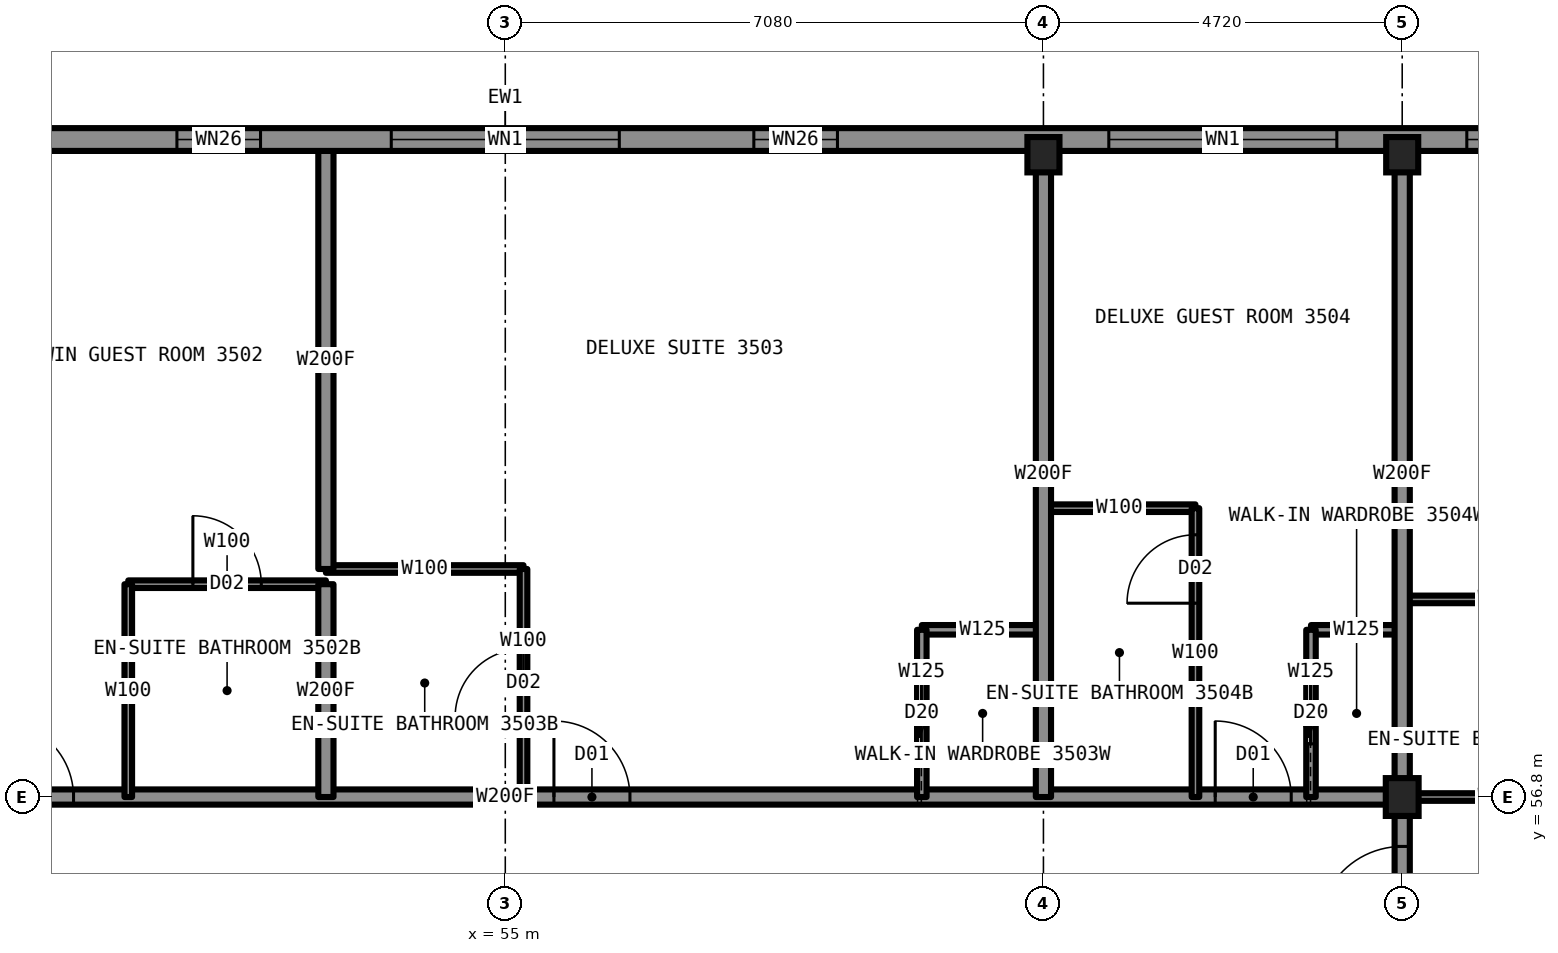
"""IFC4 building model, lengths in metres.
Left out: names, types, materials, properties, quantities, classifications, styles, units other than length and angle.
Written with IfcOpenShell. Run it as: python <this file> out.ifc"""

import sys

from ifc_helpers import new_model, si_unit, direction, frame, frame_2d, origin, origin_2d, place, context, subcontext, project, spatial, rectangle, i_section, extrude, element, fill, save


model = new_model("IFC4")
c1 = context("Model", 3, precision=1e-05, world=origin(), true_north=direction((0.0, 1.0)))
c2 = subcontext(c1, "Body", "Model", "MODEL_VIEW")
j1 = project(units=[si_unit("LENGTHUNIT", "METRE"), si_unit("PLANEANGLEUNIT", "RADIAN")], contexts=[c1])
p1 = place(None, origin())
s1 = spatial("IfcSite", under=j1, at=p1, CompositionType="ELEMENT")
p2 = place(p1, origin())
s2 = spatial("IfcBuilding", under=s1, at=p2, CompositionType="ELEMENT")
p3 = place(p2, frame((0.0, 0.0, 124.9)))
s3 = spatial("IfcBuildingStorey", under=s2, at=p3, CompositionType="ELEMENT", Elevation=124.9)
for number, where, z_axis, x_axis in (
    (1, (62.08, 65.25, 0.0), (0.0, 0.0, 1.0), (1.0, 0.0, 0.0)),
    (2, (66.8, 65.25, 0.0), (0.0, 0.0, 1.0), (1.0, 0.0, 0.0)),
):
    element("IfcColumn", number, at=place(p3, frame(where, z_axis=z_axis, x_axis=x_axis)), inside=s3, PredefinedType="COLUMN", context=c2, shape_type="SweptSolid", body=[
        extrude(i_section(OverallWidth=0.422, OverallDepth=0.465, WebThickness=0.045, FlangeThickness=0.073, at=origin_2d()), origin(), (0.0, 0.0, 1.0), 3.5),
    ])
p4 = place(p3, frame((66.8, 56.8, 0.0), z_axis=(0.0, 0.0, 1.0), x_axis=(1.0, 0.0, 0.0)))
e3 = element("IfcColumn", 3, at=p4, inside=s3, PredefinedType="COLUMN", context=c2, shape_type="SweptSolid", body=[
    extrude(i_section(OverallWidth=0.432, OverallDepth=0.498, WebThickness=0.056, FlangeThickness=0.089, at=origin_2d()), origin(), (0.0, 0.0, 1.0), 3.5),
])
p5 = place(p3, frame((66.8, 56.8, 0.0), z_axis=(0.0, 0.0, 1.0), x_axis=(1.0, 0.0, 0.0)))
e4 = element("IfcWall", 4, at=p5, inside=s3, PredefinedType="PARTITIONING", context=c2, shape_type="SweptSolid", body=[
    extrude(rectangle(XDim=2.6, YDim=0.1, at=frame_2d((1.3, 0.0))), origin(), (0.0, 0.0, 1.0), 2.573),
])
p6 = place(p3, frame((43.2, 56.8, 0.0), z_axis=(0.0, 0.0, 1.0), x_axis=(1.0, 0.0, 0.0)))
e5 = element("IfcWall", 5, at=p6, inside=s3, PredefinedType="PARTITIONING", context=c2, shape_type="SweptSolid", body=[
    extrude(rectangle(XDim=23.6, YDim=0.2, at=frame_2d((11.8, 0.0))), origin(), (0.0, 0.0, 1.0), 3.33),
])
p7 = place(p6, frame((0.7, 0.0, 0.0)))
e6 = element("IfcOpeningElement", 6, at=p7, cuts=e5, PredefinedType="OPENING", context=c2, shape_type="SweptSolid", body=[
    extrude(rectangle(XDim=1.0, YDim=2.2, at=frame_2d((0.5, 1.1))), frame((0.0, 0.11, 0.0), z_axis=(0.0, -1.0, 0.0), x_axis=(1.0, 0.0, 0.0)), (0.0, 0.0, 1.0), 0.22),
])
p8 = place(p6, frame((5.12, 0.0, 0.0)))
e7 = element("IfcOpeningElement", 7, at=p8, cuts=e5, PredefinedType="OPENING", context=c2, shape_type="SweptSolid", body=[
    extrude(rectangle(XDim=1.0, YDim=2.2, at=frame_2d((0.5, 1.1))), frame((0.0, 0.11, 0.0), z_axis=(0.0, -1.0, 0.0), x_axis=(1.0, 0.0, 0.0)), (0.0, 0.0, 1.0), 0.22),
])
p9 = place(p6, frame((12.44, 0.0, 0.0)))
e8 = element("IfcOpeningElement", 8, at=p9, cuts=e5, PredefinedType="OPENING", context=c2, shape_type="SweptSolid", body=[
    extrude(rectangle(XDim=1.0, YDim=2.2, at=frame_2d((0.5, 1.1))), frame((0.0, 0.11, 0.0), z_axis=(0.0, -1.0, 0.0), x_axis=(1.0, 0.0, 0.0)), (0.0, 0.0, 1.0), 0.22),
])
p10 = place(p6, frame((21.14, 0.0, 0.0)))
e9 = element("IfcOpeningElement", 9, at=p10, cuts=e5, PredefinedType="OPENING", context=c2, shape_type="SweptSolid", body=[
    extrude(rectangle(XDim=1.0, YDim=2.2, at=frame_2d((0.5, 1.1))), frame((0.0, 0.11, 0.0), z_axis=(0.0, -1.0, 0.0), x_axis=(1.0, 0.0, 0.0)), (0.0, 0.0, 1.0), 0.22),
])
p11 = place(p3, frame((60.48, 59.0, 0.0), z_axis=(0.0, 0.0, 1.0), x_axis=(1.0, 0.0, 0.0)))
e10 = element("IfcWall", 10, at=p11, inside=s3, PredefinedType="PARTITIONING", context=c2, shape_type="SweptSolid", body=[
    extrude(rectangle(XDim=1.6, YDim=0.125, at=frame_2d((0.8, 0.0))), origin(), (0.0, 0.0, 1.0), 3.33),
])
p12 = place(p3, frame((65.6, 59.0, 0.0), z_axis=(0.0, 0.0, 1.0), x_axis=(1.0, 0.0, 0.0)))
e11 = element("IfcWall", 11, at=p12, inside=s3, PredefinedType="PARTITIONING", context=c2, shape_type="SweptSolid", body=[
    extrude(rectangle(XDim=1.2, YDim=0.125, at=frame_2d((0.6, 0.0))), origin(), (0.0, 0.0, 1.0), 3.33),
])
p13 = place(p3, frame((66.8, 59.4, 0.0), z_axis=(0.0, 0.0, 1.0), x_axis=(1.0, 0.0, 0.0)))
e12 = element("IfcWall", 12, at=p13, inside=s3, PredefinedType="PARTITIONING", context=c2, shape_type="SweptSolid", body=[
    extrude(rectangle(XDim=2.6, YDim=0.1, at=frame_2d((1.3, 0.0))), origin(), (0.0, 0.0, 1.0), 3.33),
])
p14 = place(p3, frame((50.04, 59.6, 0.0), z_axis=(0.0, 0.0, 1.0), x_axis=(1.0, 0.0, 0.0)))
e13 = element("IfcWall", 13, at=p14, inside=s3, PredefinedType="PARTITIONING", context=c2, shape_type="SweptSolid", body=[
    extrude(rectangle(XDim=2.6, YDim=0.1, at=frame_2d((1.3, 0.0))), origin(), (0.0, 0.0, 1.0), 3.33),
])
p15 = place(p14, frame((0.85, 0.0, 0.0)))
e14 = element("IfcOpeningElement", 14, at=p15, cuts=e13, PredefinedType="OPENING", context=c2, shape_type="SweptSolid", body=[
    extrude(rectangle(XDim=0.9, YDim=2.1, at=frame_2d((0.45, 1.05))), frame((0.0, 0.06, 0.0), z_axis=(0.0, -1.0, 0.0), x_axis=(1.0, 0.0, 0.0)), (0.0, 0.0, 1.0), 0.12),
])
p16 = place(p3, frame((52.64, 59.8, 0.0), z_axis=(0.0, 0.0, 1.0), x_axis=(1.0, 0.0, 0.0)))
e15 = element("IfcWall", 15, at=p16, inside=s3, PredefinedType="PARTITIONING", context=c2, shape_type="SweptSolid", body=[
    extrude(rectangle(XDim=2.6, YDim=0.1, at=frame_2d((1.3, 0.0))), origin(), (0.0, 0.0, 1.0), 3.33),
])
p17 = place(p3, frame((62.08, 60.6, 0.0), z_axis=(0.0, 0.0, 1.0), x_axis=(1.0, 0.0, 0.0)))
e16 = element("IfcWall", 16, at=p17, inside=s3, PredefinedType="PARTITIONING", context=c2, shape_type="SweptSolid", body=[
    extrude(rectangle(XDim=2.0, YDim=0.1, at=frame_2d((1.0, 0.0))), origin(), (0.0, 0.0, 1.0), 3.33),
])
p18 = place(p3, frame((52.64, 56.8, 0.0), z_axis=(0.0, 0.0, 1.0), x_axis=(0.0, 1.0, 0.0)))
e17 = element("IfcWall", 17, at=p18, inside=s3, PredefinedType="PARTITIONING", context=c2, shape_type="SweptSolid", body=[
    extrude(rectangle(XDim=2.8, YDim=0.2, at=frame_2d((1.4, 0.0))), origin(), (0.0, 0.0, 1.0), 3.33),
])
p19 = place(p3, frame((52.64, 59.8, 0.0), z_axis=(0.0, 0.0, 1.0), x_axis=(0.0, 1.0, 0.0)))
e18 = element("IfcWall", 18, at=p19, inside=s3, PredefinedType="PARTITIONING", context=c2, shape_type="SweptSolid", body=[
    extrude(rectangle(XDim=5.5, YDim=0.2, at=frame_2d((2.75, 0.0))), origin(), (0.0, 0.0, 1.0), 3.33),
])
p20 = place(p3, frame((50.04, 56.8, 0.0), z_axis=(0.0, 0.0, 1.0), x_axis=(0.0, 1.0, 0.0)))
e19 = element("IfcWall", 19, at=p20, inside=s3, PredefinedType="PARTITIONING", context=c2, shape_type="SweptSolid", body=[
    extrude(rectangle(XDim=2.8, YDim=0.1, at=frame_2d((1.4, 0.0))), origin(), (0.0, 0.0, 1.0), 3.33),
])
p21 = place(p3, frame((55.24, 56.8, 0.0), z_axis=(0.0, 0.0, 1.0), x_axis=(0.0, 1.0, 0.0)))
e20 = element("IfcWall", 20, at=p21, inside=s3, PredefinedType="PARTITIONING", context=c2, shape_type="SweptSolid", body=[
    extrude(rectangle(XDim=3.0, YDim=0.1, at=frame_2d((1.5, 0.0))), origin(), (0.0, 0.0, 1.0), 3.33),
])
p22 = place(p21, frame((1.05, 0.0, 0.0)))
e21 = element("IfcOpeningElement", 21, at=p22, cuts=e20, PredefinedType="OPENING", context=c2, shape_type="SweptSolid", body=[
    extrude(rectangle(XDim=0.9, YDim=2.1, at=frame_2d((0.45, 1.05))), frame((0.0, 0.06, 0.0), z_axis=(0.0, -1.0, 0.0), x_axis=(1.0, 0.0, 0.0)), (0.0, 0.0, 1.0), 0.12),
])
p23 = place(p3, frame((65.6, 56.8, 0.0), z_axis=(0.0, 0.0, 1.0), x_axis=(0.0, 1.0, 0.0)))
e22 = element("IfcWall", 22, at=p23, inside=s3, PredefinedType="PARTITIONING", context=c2, shape_type="SweptSolid", body=[
    extrude(rectangle(XDim=2.2, YDim=0.125, at=frame_2d((1.1, 0.0))), origin(), (0.0, 0.0, 1.0), 3.33),
])
p24 = place(p23, frame((0.7, 0.0, 0.0)))
e23 = element("IfcOpeningElement", 23, at=p24, cuts=e22, PredefinedType="OPENING", context=c2, shape_type="SweptSolid", body=[
    extrude(rectangle(XDim=0.8, YDim=2.1, at=frame_2d((0.4, 1.05))), frame((0.0, 0.073, 0.0), z_axis=(0.0, -1.0, 0.0), x_axis=(1.0, 0.0, 0.0)), (0.0, 0.0, 1.0), 0.145),
])
p25 = place(p3, frame((66.8, 33.22, 0.0), z_axis=(0.0, 0.0, 1.0), x_axis=(0.0, 1.0, 0.0)))
e24 = element("IfcWall", 24, at=p25, inside=s3, PredefinedType="PARTITIONING", context=c2, shape_type="SweptSolid", body=[
    extrude(rectangle(XDim=23.58, YDim=0.2, at=frame_2d((11.79, 0.0))), origin(), (0.0, 0.0, 1.0), 3.33),
])
p26 = place(p25, frame((7.85, 0.0, 0.0)))
e25 = element("IfcOpeningElement", 25, at=p26, cuts=e24, PredefinedType="OPENING", context=c2, shape_type="SweptSolid", body=[
    extrude(rectangle(XDim=1.0, YDim=2.2, at=frame_2d((0.5, 1.1))), frame((0.0, 0.11, 0.0), z_axis=(0.0, -1.0, 0.0), x_axis=(1.0, 0.0, 0.0)), (0.0, 0.0, 1.0), 0.22),
])
p27 = place(p25, frame((12.42, 0.0, 0.0)))
e26 = element("IfcOpeningElement", 26, at=p27, cuts=e24, PredefinedType="OPENING", context=c2, shape_type="SweptSolid", body=[
    extrude(rectangle(XDim=1.0, YDim=2.2, at=frame_2d((0.5, 1.1))), frame((0.0, 0.11, 0.0), z_axis=(0.0, -1.0, 0.0), x_axis=(1.0, 0.0, 0.0)), (0.0, 0.0, 1.0), 0.22),
])
p28 = place(p25, frame((21.83, 0.0, 0.0)))
e27 = element("IfcOpeningElement", 27, at=p28, cuts=e24, PredefinedType="OPENING", context=c2, shape_type="SweptSolid", body=[
    extrude(rectangle(XDim=1.1, YDim=2.2, at=frame_2d((0.55, 1.1))), frame((0.0, 0.11, 0.0), z_axis=(0.0, -1.0, 0.0), x_axis=(1.0, 0.0, 0.0)), (0.0, 0.0, 1.0), 0.22),
])
p29 = place(p25, frame((0.63, 0.0, 0.0)))
e28 = element("IfcOpeningElement", 28, at=p29, cuts=e24, PredefinedType="OPENING", context=c2, shape_type="SweptSolid", body=[
    extrude(rectangle(XDim=1.1, YDim=2.2, at=frame_2d((0.55, 1.1))), frame((0.0, 0.11, 0.0), z_axis=(0.0, -1.0, 0.0), x_axis=(1.0, 0.0, 0.0)), (0.0, 0.0, 1.0), 0.22),
])
p30 = place(p3, frame((66.8, 56.8, 0.0), z_axis=(0.0, 0.0, 1.0), x_axis=(0.0, 1.0, 0.0)))
e29 = element("IfcWall", 29, at=p30, inside=s3, PredefinedType="PARTITIONING", context=c2, shape_type="SweptSolid", body=[
    extrude(rectangle(XDim=8.5, YDim=0.2, at=frame_2d((4.25, 0.0))), origin(), (0.0, 0.0, 1.0), 2.573),
])
p31 = place(p3, frame((60.48, 56.8, 0.0), z_axis=(0.0, 0.0, 1.0), x_axis=(0.0, 1.0, 0.0)))
e30 = element("IfcWall", 30, at=p31, inside=s3, PredefinedType="PARTITIONING", context=c2, shape_type="SweptSolid", body=[
    extrude(rectangle(XDim=2.2, YDim=0.125, at=frame_2d((1.1, 0.0))), origin(), (0.0, 0.0, 1.0), 3.33),
])
p32 = place(p31, frame((0.7, 0.0, 0.0)))
e31 = element("IfcOpeningElement", 31, at=p32, cuts=e30, PredefinedType="OPENING", context=c2, shape_type="SweptSolid", body=[
    extrude(rectangle(XDim=0.8, YDim=2.1, at=frame_2d((0.4, 1.05))), frame((0.0, 0.073, 0.0), z_axis=(0.0, -1.0, 0.0), x_axis=(1.0, 0.0, 0.0)), (0.0, 0.0, 1.0), 0.145),
])
p33 = place(p3, frame((62.08, 56.8, 0.0), z_axis=(0.0, 0.0, 1.0), x_axis=(0.0, 1.0, 0.0)))
e32 = element("IfcWall", 32, at=p33, inside=s3, PredefinedType="PARTITIONING", context=c2, shape_type="SweptSolid", body=[
    extrude(rectangle(XDim=8.5, YDim=0.2, at=frame_2d((4.25, 0.0))), origin(), (0.0, 0.0, 1.0), 2.573),
])
p34 = place(p3, frame((64.08, 56.8, 0.0), z_axis=(0.0, 0.0, 1.0), x_axis=(0.0, 1.0, 0.0)))
e33 = element("IfcWall", 33, at=p34, inside=s3, PredefinedType="PARTITIONING", context=c2, shape_type="SweptSolid", body=[
    extrude(rectangle(XDim=3.8, YDim=0.1, at=frame_2d((1.9, 0.0))), origin(), (0.0, 0.0, 1.0), 3.33),
])
p35 = place(p34, frame((2.55, 0.0, 0.0)))
e34 = element("IfcOpeningElement", 34, at=p35, cuts=e33, PredefinedType="OPENING", context=c2, shape_type="SweptSolid", body=[
    extrude(rectangle(XDim=0.9, YDim=2.1, at=frame_2d((0.45, 1.05))), frame((0.0, 0.06, 0.0), z_axis=(0.0, -1.0, 0.0), x_axis=(1.0, 0.0, 0.0)), (0.0, 0.0, 1.0), 0.12),
])
p36 = place(p3, frame((70.1, 65.45, 0.0), z_axis=(0.0, 0.0, 1.0), x_axis=(-1.0, 0.0, 0.0)))
e35 = element("IfcWall", 35, at=p36, inside=s3, PredefinedType="SOLIDWALL", context=c2, shape_type="SweptSolid", body=[
    extrude(rectangle(XDim=30.2, YDim=0.3, at=frame_2d((15.1, 0.0))), origin(), (0.0, 0.0, 1.0), 2.83),
])
p37 = place(p36, frame((0.85, 0.0, 0.5)))
e36 = element("IfcOpeningElement", 36, at=p37, cuts=e35, PredefinedType="OPENING", context=c2, shape_type="SweptSolid", body=[
    extrude(rectangle(XDim=1.6, YDim=2.0, at=frame_2d((0.8, 1.0))), frame((0.0, 0.16, 0.0), z_axis=(0.0, -1.0, 0.0), x_axis=(1.0, 0.0, 0.0)), (0.0, 0.0, 1.0), 0.32),
])
p38 = place(p36, frame((4.16, 0.0, 0.5)))
e37 = element("IfcOpeningElement", 37, at=p38, cuts=e35, PredefinedType="OPENING", context=c2, shape_type="SweptSolid", body=[
    extrude(rectangle(XDim=3.0, YDim=2.0, at=frame_2d((1.5, 1.0))), frame((0.0, 0.16, 0.0), z_axis=(0.0, -1.0, 0.0), x_axis=(1.0, 0.0, 0.0)), (0.0, 0.0, 1.0), 0.32),
])
p39 = place(p36, frame((8.88, 0.0, 0.5)))
e38 = element("IfcOpeningElement", 38, at=p39, cuts=e35, PredefinedType="OPENING", context=c2, shape_type="SweptSolid", body=[
    extrude(rectangle(XDim=3.0, YDim=2.0, at=frame_2d((1.5, 1.0))), frame((0.0, 0.16, 0.0), z_axis=(0.0, -1.0, 0.0), x_axis=(1.0, 0.0, 0.0)), (0.0, 0.0, 1.0), 0.32),
])
p40 = place(p36, frame((18.32, 0.0, 0.5)))
e39 = element("IfcOpeningElement", 39, at=p40, cuts=e35, PredefinedType="OPENING", context=c2, shape_type="SweptSolid", body=[
    extrude(rectangle(XDim=3.0, YDim=2.0, at=frame_2d((1.5, 1.0))), frame((0.0, 0.16, 0.0), z_axis=(0.0, -1.0, 0.0), x_axis=(1.0, 0.0, 0.0)), (0.0, 0.0, 1.0), 0.32),
])
p41 = place(p36, frame((23.04, 0.0, 0.5)))
e40 = element("IfcOpeningElement", 40, at=p41, cuts=e35, PredefinedType="OPENING", context=c2, shape_type="SweptSolid", body=[
    extrude(rectangle(XDim=3.0, YDim=2.0, at=frame_2d((1.5, 1.0))), frame((0.0, 0.16, 0.0), z_axis=(0.0, -1.0, 0.0), x_axis=(1.0, 0.0, 0.0)), (0.0, 0.0, 1.0), 0.32),
])
p42 = place(p36, frame((27.75, 0.0, 0.5)))
e41 = element("IfcOpeningElement", 41, at=p42, cuts=e35, PredefinedType="OPENING", context=c2, shape_type="SweptSolid", body=[
    extrude(rectangle(XDim=1.6, YDim=2.0, at=frame_2d((0.8, 1.0))), frame((0.0, 0.16, 0.0), z_axis=(0.0, -1.0, 0.0), x_axis=(1.0, 0.0, 0.0)), (0.0, 0.0, 1.0), 0.32),
])
p43 = place(p8, origin())
e42 = element("IfcDoor", 42, at=p43, inside=s3, OperationType="SINGLE_SWING_LEFT", PredefinedType="DOOR", context=c2, shape_type="SweptSolid", body=[
    extrude(rectangle(XDim=1.0, YDim=2.2, at=frame_2d((0.5, 1.1))), frame((0.0, 0.025, 0.0), z_axis=(0.0, -1.0, 0.0), x_axis=(1.0, 0.0, 0.0)), (0.0, 0.0, 1.0), 0.05),
])
fill(e7, e42)
p44 = place(p15, origin())
e43 = element("IfcDoor", 43, at=p44, inside=s3, OperationType="SINGLE_SWING_RIGHT", PredefinedType="DOOR", context=c2, shape_type="SweptSolid", body=[
    extrude(rectangle(XDim=0.9, YDim=2.1, at=frame_2d((0.45, 1.05))), frame((0.0, 0.025, 0.0), z_axis=(0.0, -1.0, 0.0), x_axis=(1.0, 0.0, 0.0)), (0.0, 0.0, 1.0), 0.05),
])
fill(e14, e43)
p45 = place(p9, origin())
e44 = element("IfcDoor", 44, at=p45, inside=s3, OperationType="SINGLE_SWING_LEFT", PredefinedType="DOOR", context=c2, shape_type="SweptSolid", body=[
    extrude(rectangle(XDim=1.0, YDim=2.2, at=frame_2d((0.5, 1.1))), frame((0.0, 0.025, 0.0), z_axis=(0.0, -1.0, 0.0), x_axis=(1.0, 0.0, 0.0)), (0.0, 0.0, 1.0), 0.05),
])
fill(e8, e44)
p46 = place(p22, origin())
e45 = element("IfcDoor", 45, at=p46, inside=s3, OperationType="SINGLE_SWING_RIGHT", PredefinedType="DOOR", context=c2, shape_type="SweptSolid", body=[
    extrude(rectangle(XDim=0.9, YDim=2.1, at=frame_2d((0.45, 1.05))), frame((0.0, 0.025, 0.0), z_axis=(0.0, -1.0, 0.0), x_axis=(1.0, 0.0, 0.0)), (0.0, 0.0, 1.0), 0.05),
])
fill(e21, e45)
p47 = place(p32, origin())
e46 = element("IfcDoor", 46, at=p47, inside=s3, OperationType="SLIDING_TO_LEFT", PredefinedType="DOOR", context=c2, shape_type="SweptSolid", body=[
    extrude(rectangle(XDim=0.8, YDim=2.1, at=frame_2d((0.4, 1.05))), frame((0.0, 0.025, 0.0), z_axis=(0.0, -1.0, 0.0), x_axis=(1.0, 0.0, 0.0)), (0.0, 0.0, 1.0), 0.05),
])
fill(e31, e46)
p48 = place(p10, origin())
e47 = element("IfcDoor", 47, at=p48, inside=s3, OperationType="SINGLE_SWING_LEFT", PredefinedType="DOOR", context=c2, shape_type="SweptSolid", body=[
    extrude(rectangle(XDim=1.0, YDim=2.2, at=frame_2d((0.5, 1.1))), frame((0.0, 0.025, 0.0), z_axis=(0.0, -1.0, 0.0), x_axis=(1.0, 0.0, 0.0)), (0.0, 0.0, 1.0), 0.05),
])
fill(e9, e47)
p49 = place(p35, origin())
e48 = element("IfcDoor", 48, at=p49, inside=s3, OperationType="SINGLE_SWING_RIGHT", PredefinedType="DOOR", context=c2, shape_type="SweptSolid", body=[
    extrude(rectangle(XDim=0.9, YDim=2.1, at=frame_2d((0.45, 1.05))), frame((0.0, 0.025, 0.0), z_axis=(0.0, -1.0, 0.0), x_axis=(1.0, 0.0, 0.0)), (0.0, 0.0, 1.0), 0.05),
])
fill(e34, e48)
p50 = place(p24, origin())
e49 = element("IfcDoor", 49, at=p50, inside=s3, OperationType="SLIDING_TO_LEFT", PredefinedType="DOOR", context=c2, shape_type="SweptSolid", body=[
    extrude(rectangle(XDim=0.8, YDim=2.1, at=frame_2d((0.4, 1.05))), frame((0.0, 0.025, 0.0), z_axis=(0.0, -1.0, 0.0), x_axis=(1.0, 0.0, 0.0)), (0.0, 0.0, 1.0), 0.05),
])
fill(e23, e49)
p51 = place(p28, origin())
e50 = element("IfcDoor", 50, at=p51, inside=s3, OperationType="SINGLE_SWING_LEFT", PredefinedType="DOOR", context=c2, shape_type="SweptSolid", body=[
    extrude(rectangle(XDim=1.1, YDim=2.2, at=frame_2d((0.55, 1.1))), frame((0.0, 0.025, 0.0), z_axis=(0.0, -1.0, 0.0), x_axis=(1.0, 0.0, 0.0)), (0.0, 0.0, 1.0), 0.05),
])
fill(e27, e50)
p52 = place(p37, origin())
e51 = element("IfcWindow", 51, at=p52, inside=s3, PartitioningType="SINGLE_PANEL", PredefinedType="WINDOW", context=c2, shape_type="SweptSolid", body=[
    extrude(rectangle(XDim=1.6, YDim=2.0, at=frame_2d((0.8, 1.0))), frame((0.0, 0.03, 0.0), z_axis=(0.0, -1.0, 0.0), x_axis=(1.0, 0.0, 0.0)), (0.0, 0.0, 1.0), 0.06),
])
fill(e36, e51)
p53 = place(p38, origin())
e52 = element("IfcWindow", 52, at=p53, inside=s3, PartitioningType="SINGLE_PANEL", PredefinedType="WINDOW", context=c2, shape_type="SweptSolid", body=[
    extrude(rectangle(XDim=3.0, YDim=2.0, at=frame_2d((1.5, 1.0))), frame((0.0, 0.03, 0.0), z_axis=(0.0, -1.0, 0.0), x_axis=(1.0, 0.0, 0.0)), (0.0, 0.0, 1.0), 0.06),
])
fill(e37, e52)
p54 = place(p39, origin())
e53 = element("IfcWindow", 53, at=p54, inside=s3, PartitioningType="SINGLE_PANEL", PredefinedType="WINDOW", context=c2, shape_type="SweptSolid", body=[
    extrude(rectangle(XDim=3.0, YDim=2.0, at=frame_2d((1.5, 1.0))), frame((0.0, 0.03, 0.0), z_axis=(0.0, -1.0, 0.0), x_axis=(1.0, 0.0, 0.0)), (0.0, 0.0, 1.0), 0.06),
])
fill(e38, e53)
p55 = place(p40, origin())
e54 = element("IfcWindow", 54, at=p55, inside=s3, PartitioningType="SINGLE_PANEL", PredefinedType="WINDOW", context=c2, shape_type="SweptSolid", body=[
    extrude(rectangle(XDim=3.0, YDim=2.0, at=frame_2d((1.5, 1.0))), frame((0.0, 0.03, 0.0), z_axis=(0.0, -1.0, 0.0), x_axis=(1.0, 0.0, 0.0)), (0.0, 0.0, 1.0), 0.06),
])
fill(e39, e54)
save(model, sys.argv[1])
